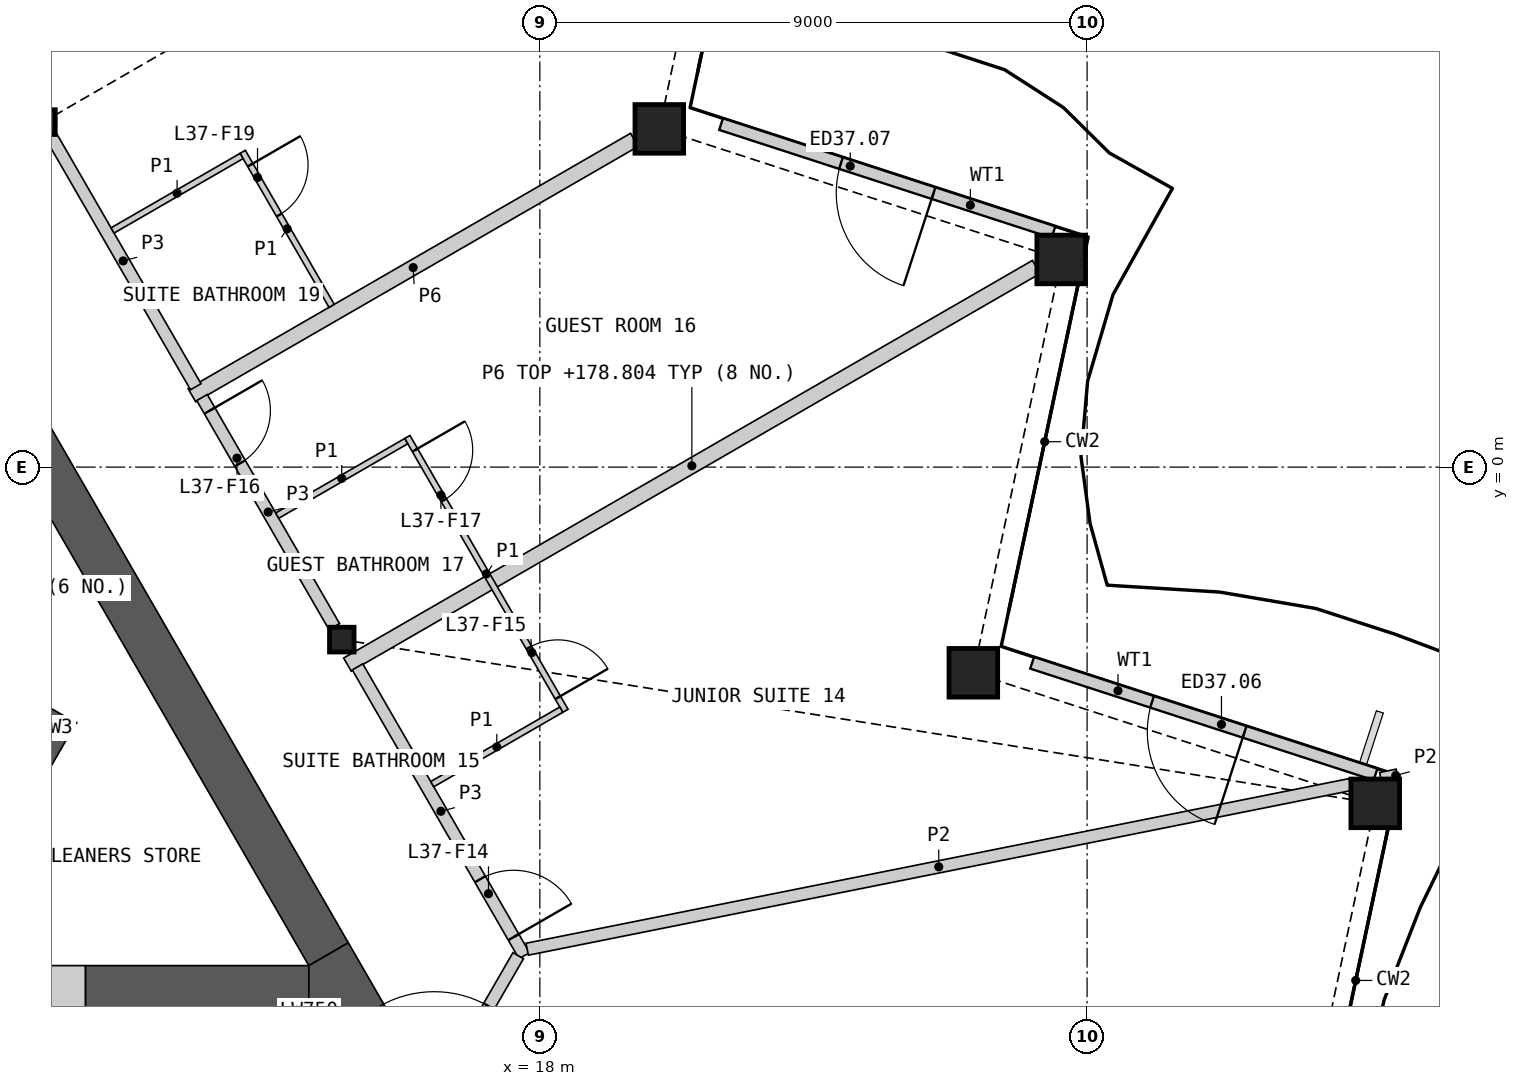
"""IFC4 building model, lengths in metres.
Left out: names, types, materials, properties, quantities, classifications, styles, units other than length and angle.
Written with IfcOpenShell. Run it as: python <this file> out.ifc"""

import sys

from ifc_helpers import new_model, si_unit, direction, frame, frame_2d, origin, origin_2d, place, context, subcontext, project, spatial, polyline, rectangle, hollow_rectangle, i_section, outline, extrude, element, fill, save


model = new_model("IFC4")
c1 = context("Model", 3, precision=1e-05, world=origin(), true_north=direction((0.0, 1.0)))
c2 = subcontext(c1, "Body", "Model", "MODEL_VIEW")
j1 = project(units=[si_unit("LENGTHUNIT", "METRE"), si_unit("PLANEANGLEUNIT", "RADIAN")], contexts=[c1])
p1 = place(None, origin())
s1 = spatial("IfcSite", under=j1, at=p1, CompositionType="ELEMENT")
p2 = place(p1, origin())
s2 = spatial("IfcBuilding", under=s1, at=p2, CompositionType="ELEMENT")
p3 = place(p2, frame((0.0, 0.0, 176.4)))
s3 = spatial("IfcBuildingStorey", under=s2, at=p3, CompositionType="ELEMENT", Elevation=176.4)
for number, where, z_axis, x_axis in (
    (1, (31.739, -5.53, 0.0), (0.0, 0.0, 1.0), (1.0, 0.0, 0.0)),
    (2, (25.129, -3.383, 0.0), (0.0, 0.0, 1.0), (1.0, 0.0, 0.0)),
    (3, (26.574, 3.415, 0.0), (0.0, 0.0, 1.0), (1.0, 0.0, 0.0)),
    (4, (19.965, 5.563, 0.0), (0.0, 0.0, 1.0), (1.0, 0.0, 0.0)),
):
    element("IfcColumn", number, at=place(p3, frame(where, z_axis=z_axis, x_axis=x_axis)), inside=s3, PredefinedType="COLUMN", context=c2, shape_type="SweptSolid", body=[
        extrude(hollow_rectangle(XDim=0.8, YDim=0.8, WallThickness=0.05, at=origin_2d()), origin(), (0.0, 0.0, 1.0), 3.6),
    ])
for number, where, z_axis, x_axis in (
    (5, (14.743, -2.837, 0.0), (0.0, 0.0, 1.0), (1.0, 0.0, 0.0)),
    (6, (9.828, 5.675, 0.0), (0.0, 0.0, 1.0), (1.0, 0.0, 0.0)),
):
    element("IfcColumn", number, at=place(p3, frame(where, z_axis=z_axis, x_axis=x_axis)), inside=s3, PredefinedType="COLUMN", context=c2, shape_type="SweptSolid", body=[
        extrude(i_section(OverallWidth=0.404, OverallDepth=0.407, WebThickness=0.027, FlangeThickness=0.044, at=origin_2d()), origin(), (0.0, 0.0, 1.0), 3.6),
    ])
p4 = place(p3, frame((31.743, -5.054, 0.0), z_axis=(0.0, 0.0, 1.0), x_axis=(-0.951061260164, 0.309002393867, 0.0)))
e7 = element("IfcWall", 7, at=p4, inside=s3, PredefinedType="SOLIDWALL", context=c2, shape_type="SweptSolid", body=[
    extrude(rectangle(XDim=5.938, YDim=0.2, at=frame_2d((2.969, 0.0))), origin(), (0.0, 0.0, 1.0), 2.701),
])
p5 = place(p4, frame((2.264, 0.0, 0.0)))
e8 = element("IfcOpeningElement", 8, at=p5, cuts=e7, PredefinedType="OPENING", context=c2, shape_type="SweptSolid", body=[
    extrude(rectangle(XDim=1.6, YDim=2.4, at=frame_2d((0.8, 1.2))), frame((0.0, 0.11, 0.0), z_axis=(0.0, -1.0, 0.0), x_axis=(1.0, 0.0, 0.0)), (0.0, 0.0, 1.0), 0.22),
])
p6 = place(p3, frame((26.447, 3.865, 0.0), z_axis=(0.0, 0.0, 1.0), x_axis=(-0.951043432761, 0.309057258453, 0.0)))
e9 = element("IfcWall", 9, at=p6, inside=s3, PredefinedType="SOLIDWALL", context=c2, shape_type="SweptSolid", body=[
    extrude(rectangle(XDim=5.748, YDim=0.2, at=frame_2d((2.874, 0.0))), origin(), (0.0, 0.0, 1.0), 2.701),
])
p7 = place(p6, frame((2.074, 0.0, 0.0)))
e10 = element("IfcOpeningElement", 10, at=p7, cuts=e9, PredefinedType="OPENING", context=c2, shape_type="SweptSolid", body=[
    extrude(rectangle(XDim=1.6, YDim=2.4, at=frame_2d((0.8, 1.2))), frame((0.0, 0.11, 0.0), z_axis=(0.0, -1.0, 0.0), x_axis=(1.0, 0.0, 0.0)), (0.0, 0.0, 1.0), 0.22),
])
p8 = place(p3, origin())
e11 = element("IfcWall", 11, at=p8, inside=s3, PredefinedType="SHEAR", context=c2, shape_type="SweptSolid", body=[
    extrude(outline(polyline([(8.83, -6.881), (10.374, -4.206), (10.032, -4.298), (8.738, -6.539), (8.83, -6.881)])), origin(), (0.0, 0.0, 1.0), 3.25),
])
p9 = place(p3, origin())
e12 = element("IfcWall", 12, at=p9, inside=s3, PredefinedType="SHEAR", context=c2, shape_type="SweptSolid", body=[
    extrude(outline(polyline([(10.032, -4.298), (10.374, -4.206), (5.307, -1.281), (5.182, -1.498), (10.032, -4.298)])), origin(), (0.0, 0.0, 1.0), 3.25),
])
p10 = place(p3, frame((10.525, -8.574, 0.0), z_axis=(0.0, 0.0, 1.0), x_axis=(1.0, 0.0, 0.0)))
e13 = element("IfcWall", 13, at=p10, inside=s3, PredefinedType="SHEAR", context=c2, shape_type="SweptSolid", body=[
    extrude(rectangle(XDim=3.676, YDim=0.75, at=frame_2d((1.838, 0.0))), origin(), (0.0, 0.0, 1.0), 3.25),
])
p11 = place(p3, frame((14.526, -8.011, 0.0), z_axis=(0.0, 0.0, 1.0), x_axis=(-0.499994855372, 0.866028374016, 0.0)))
e14 = element("IfcWall", 14, at=p11, inside=s3, PredefinedType="SHEAR", context=c2, shape_type="SweptSolid", body=[
    extrude(rectangle(XDim=14.301, YDim=0.75, at=frame_2d((7.15, 0.0))), origin(), (0.0, 0.0, 1.0), 3.25),
])
p12 = place(p3, origin())
e15 = element("IfcWall", 15, at=p12, inside=s3, PredefinedType="SHEAR", context=c2, shape_type="SweptSolid", body=[
    extrude(outline(polyline([(14.201, -8.949), (14.201, -8.199), (14.851, -7.824), (15.5, -8.949), (14.201, -8.949)])), origin(), (0.0, 0.0, 1.0), 3.25),
])
p13 = place(p3, frame((8.325, -8.574, 0.0), z_axis=(0.0, 0.0, 1.0), x_axis=(1.0, 0.0, 0.0)))
e16 = element("IfcWall", 16, at=p13, inside=s3, PredefinedType="SHEAR", context=c2, shape_type="SweptSolid", body=[
    extrude(rectangle(XDim=2.2, YDim=0.75, at=frame_2d((1.1, 0.0))), origin(), (0.0, 0.0, 1.0), 3.25),
])
p14 = place(p13, frame((0.6, 0.0, 0.0)))
e17 = element("IfcOpeningElement", 17, at=p14, cuts=e16, PredefinedType="OPENING", context=c2, shape_type="SweptSolid", body=[
    extrude(rectangle(XDim=1.0, YDim=2.1, at=frame_2d((0.5, 1.05))), frame((0.0, 0.385, 0.0), z_axis=(0.0, -1.0, 0.0), x_axis=(1.0, 0.0, 0.0)), (0.0, 0.0, 1.0), 0.77),
])
p15 = place(p3, frame((14.836, -3.249, 0.0), z_axis=(0.0, 0.0, 1.0), x_axis=(0.866022412254, 0.500005181446, 0.0)))
e18 = element("IfcWall", 18, at=p15, inside=s3, PredefinedType="PARTITIONING", context=c2, shape_type="SweptSolid", body=[
    extrude(rectangle(XDim=13.081, YDim=0.25, at=frame_2d((6.541, 0.0))), origin(), (0.0, 0.0, 1.0), 2.404),
])
p16 = place(p3, frame((12.278, 1.182, 0.0), z_axis=(0.0, 0.0, 1.0), x_axis=(0.866024457297, 0.500001639361, 0.0)))
e19 = element("IfcWall", 19, at=p16, inside=s3, PredefinedType="PARTITIONING", context=c2, shape_type="SweptSolid", body=[
    extrude(rectangle(XDim=8.402, YDim=0.25, at=frame_2d((4.201, 0.0))), origin(), (0.0, 0.0, 1.0), 2.404),
])
p17 = place(p3, frame((15.002, -3.286, 0.0), z_axis=(0.0, 0.0, 1.0), x_axis=(0.500007607708, -0.866021011428, 0.0)))
e20 = element("IfcWall", 20, at=p17, inside=s3, PredefinedType="PARTITIONING", context=c2, shape_type="SweptSolid", body=[
    extrude(rectangle(XDim=5.484, YDim=0.2, at=frame_2d((2.742, 0.0))), origin(), (0.0, 0.0, 1.0), 3.25),
])
p18 = place(p17, frame((4.032, 0.0, 0.0)))
e21 = element("IfcOpeningElement", 21, at=p18, cuts=e20, PredefinedType="OPENING", context=c2, shape_type="SweptSolid", body=[
    extrude(rectangle(XDim=1.1, YDim=2.1, at=frame_2d((0.55, 1.05))), frame((0.0, 0.11, 0.0), z_axis=(0.0, -1.0, 0.0), x_axis=(1.0, 0.0, 0.0)), (0.0, 0.0, 1.0), 0.22),
])
p19 = place(p3, frame((9.952, 5.461, 0.0), z_axis=(0.0, 0.0, 1.0), x_axis=(0.499990736708, -0.866030751883, 0.0)))
e22 = element("IfcWall", 22, at=p19, inside=s3, PredefinedType="PARTITIONING", context=c2, shape_type="SweptSolid", body=[
    extrude(rectangle(XDim=4.779, YDim=0.2, at=frame_2d((2.389, 0.0))), origin(), (0.0, 0.0, 1.0), 3.25),
])
p20 = place(p3, frame((12.444, 1.145, 0.0), z_axis=(0.0, 0.0, 1.0), x_axis=(0.500007404367, -0.866021128829, 0.0)))
e23 = element("IfcWall", 23, at=p20, inside=s3, PredefinedType="PARTITIONING", context=c2, shape_type="SweptSolid", body=[
    extrude(rectangle(XDim=4.351, YDim=0.2, at=frame_2d((2.176, 0.0))), origin(), (0.0, 0.0, 1.0), 3.25),
])
p21 = place(p20, frame((0.25, 0.0, 0.0)))
e24 = element("IfcOpeningElement", 24, at=p21, cuts=e23, PredefinedType="OPENING", context=c2, shape_type="SweptSolid", body=[
    extrude(rectangle(XDim=1.0, YDim=2.1, at=frame_2d((0.5, 1.05))), frame((0.0, 0.11, 0.0), z_axis=(0.0, -1.0, 0.0), x_axis=(1.0, 0.0, 0.0)), (0.0, 0.0, 1.0), 0.22),
])
p22 = place(p3, frame((15.731, -11.349, 0.0), z_axis=(0.0, 0.0, 1.0), x_axis=(0.499961815444, 0.866047448526, 0.0)))
e25 = element("IfcWall", 25, at=p22, inside=s3, PredefinedType="PARTITIONING", context=c2, shape_type="SweptSolid", body=[
    extrude(rectangle(XDim=3.826, YDim=0.2, at=frame_2d((1.913, 0.0))), origin(), (0.0, 0.0, 1.0), 3.25),
])
p23 = place(p22, frame((1.064, 0.0, 0.0)))
e26 = element("IfcOpeningElement", 26, at=p23, cuts=e25, PredefinedType="OPENING", context=c2, shape_type="SweptSolid", body=[
    extrude(rectangle(XDim=1.8, YDim=2.1, at=frame_2d((0.9, 1.05))), frame((0.0, 0.11, 0.0), z_axis=(0.0, -1.0, 0.0), x_axis=(1.0, 0.0, 0.0)), (0.0, 0.0, 1.0), 0.22),
])
p24 = place(p3, frame((17.792, -7.929, 0.0), z_axis=(0.0, 0.0, 1.0), x_axis=(0.980565709097, 0.196190953266, 0.0)))
e27 = element("IfcWall", 27, at=p24, inside=s3, PredefinedType="PARTITIONING", context=c2, shape_type="SweptSolid", body=[
    extrude(rectangle(XDim=13.805, YDim=0.2, at=frame_2d((6.903, 0.0))), origin(), (0.0, 0.0, 1.0), 2.404),
])
p25 = place(p3, frame((31.831, -5.12, 0.0), z_axis=(0.0, 0.0, 1.0), x_axis=(0.980512850695, 0.19645495571, 0.0)))
e28 = element("IfcWall", 28, at=p25, inside=s3, PredefinedType="PARTITIONING", context=c2, shape_type="SweptSolid", body=[
    extrude(rectangle(XDim=0.277, YDim=0.2, at=frame_2d((0.139, 0.0))), origin(), (0.0, 0.0, 1.0), 2.404),
])
p26 = place(p3, frame((15.821, 0.495, 0.0), z_axis=(0.0, 0.0, 1.0), x_axis=(0.500006934395, -0.866021400173, 0.0)))
e29 = element("IfcWall", 29, at=p26, inside=s3, PredefinedType="PARTITIONING", context=c2, shape_type="SweptSolid", body=[
    extrude(rectangle(XDim=5.2, YDim=0.1, at=frame_2d((2.6, 0.0))), origin(), (0.0, 0.0, 1.0), 2.404),
])
p27 = place(p26, frame((4.0, 0.0, 0.0)))
e30 = element("IfcOpeningElement", 30, at=p27, cuts=e29, PredefinedType="OPENING", context=c2, shape_type="SweptSolid", body=[
    extrude(rectangle(XDim=0.95, YDim=2.1, at=frame_2d((0.475, 1.05))), frame((0.0, 0.06, 0.0), z_axis=(0.0, -1.0, 0.0), x_axis=(1.0, 0.0, 0.0)), (0.0, 0.0, 1.0), 0.12),
])
p28 = place(p26, frame((0.25, 0.0, 0.0)))
e31 = element("IfcOpeningElement", 31, at=p28, cuts=e29, PredefinedType="OPENING", context=c2, shape_type="SweptSolid", body=[
    extrude(rectangle(XDim=0.95, YDim=2.1, at=frame_2d((0.475, 1.05))), frame((0.0, 0.06, 0.0), z_axis=(0.0, -1.0, 0.0), x_axis=(1.0, 0.0, 0.0)), (0.0, 0.0, 1.0), 0.12),
])
p29 = place(p3, frame((13.113, 5.186, 0.0), z_axis=(0.0, 0.0, 1.0), x_axis=(0.499963291492, -0.866046596414, 0.0)))
e32 = element("IfcWall", 32, at=p29, inside=s3, PredefinedType="PARTITIONING", context=c2, shape_type="SweptSolid", body=[
    extrude(rectangle(XDim=2.925, YDim=0.1, at=frame_2d((1.462, 0.0))), origin(), (0.0, 0.0, 1.0), 2.404),
])
p30 = place(p29, frame((0.25, 0.0, 0.0)))
e33 = element("IfcOpeningElement", 33, at=p30, cuts=e32, PredefinedType="OPENING", context=c2, shape_type="SweptSolid", body=[
    extrude(rectangle(XDim=0.95, YDim=2.1, at=frame_2d((0.475, 1.05))), frame((0.0, 0.06, 0.0), z_axis=(0.0, -1.0, 0.0), x_axis=(1.0, 0.0, 0.0)), (0.0, 0.0, 1.0), 0.12),
])
p31 = place(p3, frame((16.231, -5.215, 0.0), z_axis=(0.0, 0.0, 1.0), x_axis=(0.866057815567, 0.499943856944, 0.0)))
e34 = element("IfcWall", 34, at=p31, inside=s3, PredefinedType="PARTITIONING", context=c2, shape_type="SweptSolid", body=[
    extrude(rectangle(XDim=2.45, YDim=0.1, at=frame_2d((1.225, 0.0))), origin(), (0.0, 0.0, 1.0), 2.404),
])
p32 = place(p3, frame((13.681, -0.798, 0.0), z_axis=(0.0, 0.0, 1.0), x_axis=(0.866032905446, 0.499987006516, 0.0)))
e35 = element("IfcWall", 35, at=p32, inside=s3, PredefinedType="PARTITIONING", context=c2, shape_type="SweptSolid", body=[
    extrude(rectangle(XDim=2.45, YDim=0.1, at=frame_2d((1.225, 0.0))), origin(), (0.0, 0.0, 1.0), 2.404),
])
p33 = place(p3, frame((10.973, 3.892, 0.0), z_axis=(0.0, 0.0, 1.0), x_axis=(0.866014668023, 0.500018594424, 0.0)))
e36 = element("IfcWall", 36, at=p33, inside=s3, PredefinedType="PARTITIONING", context=c2, shape_type="SweptSolid", body=[
    extrude(rectangle(XDim=2.45, YDim=0.1, at=frame_2d((1.225, 0.0))), origin(), (0.0, 0.0, 1.0), 2.404),
])
p34 = place(p5, origin())
e37 = element("IfcDoor", 37, at=p34, inside=s3, OperationType="DOUBLE_DOOR_SINGLE_SWING", PredefinedType="DOOR", context=c2, shape_type="SweptSolid", body=[
    extrude(rectangle(XDim=1.6, YDim=2.4, at=frame_2d((0.8, 1.2))), frame((0.0, 0.025, 0.0), z_axis=(0.0, -1.0, 0.0), x_axis=(1.0, 0.0, 0.0)), (0.0, 0.0, 1.0), 0.05),
])
fill(e8, e37)
p35 = place(p7, origin())
e38 = element("IfcDoor", 38, at=p35, inside=s3, OperationType="DOUBLE_DOOR_SINGLE_SWING", PredefinedType="DOOR", context=c2, shape_type="SweptSolid", body=[
    extrude(rectangle(XDim=1.6, YDim=2.4, at=frame_2d((0.8, 1.2))), frame((0.0, 0.025, 0.0), z_axis=(0.0, -1.0, 0.0), x_axis=(1.0, 0.0, 0.0)), (0.0, 0.0, 1.0), 0.05),
])
fill(e10, e38)
p36 = place(p23, origin())
e39 = element("IfcDoor", 39, at=p36, inside=s3, OperationType="DOUBLE_DOOR_SINGLE_SWING", PredefinedType="DOOR", context=c2, shape_type="SweptSolid", body=[
    extrude(rectangle(XDim=1.8, YDim=2.1, at=frame_2d((0.9, 1.05))), frame((0.0, 0.025, 0.0), z_axis=(0.0, -1.0, 0.0), x_axis=(1.0, 0.0, 0.0)), (0.0, 0.0, 1.0), 0.05),
])
fill(e26, e39)
p37 = place(p18, origin())
e40 = element("IfcDoor", 40, at=p37, inside=s3, OperationType="SINGLE_SWING_RIGHT", PredefinedType="DOOR", context=c2, shape_type="SweptSolid", body=[
    extrude(rectangle(XDim=1.1, YDim=2.1, at=frame_2d((0.55, 1.05))), frame((0.0, 0.025, 0.0), z_axis=(0.0, -1.0, 0.0), x_axis=(1.0, 0.0, 0.0)), (0.0, 0.0, 1.0), 0.05),
])
fill(e21, e40)
p38 = place(p27, origin())
e41 = element("IfcDoor", 41, at=p38, inside=s3, OperationType="SINGLE_SWING_RIGHT", PredefinedType="DOOR", context=c2, shape_type="SweptSolid", body=[
    extrude(rectangle(XDim=0.95, YDim=2.1, at=frame_2d((0.475, 1.05))), frame((0.0, 0.025, 0.0), z_axis=(0.0, -1.0, 0.0), x_axis=(1.0, 0.0, 0.0)), (0.0, 0.0, 1.0), 0.05),
])
fill(e30, e41)
p39 = place(p21, origin())
e42 = element("IfcDoor", 42, at=p39, inside=s3, OperationType="SINGLE_SWING_LEFT", PredefinedType="DOOR", context=c2, shape_type="SweptSolid", body=[
    extrude(rectangle(XDim=1.0, YDim=2.1, at=frame_2d((0.5, 1.05))), frame((0.0, 0.025, 0.0), z_axis=(0.0, -1.0, 0.0), x_axis=(1.0, 0.0, 0.0)), (0.0, 0.0, 1.0), 0.05),
])
fill(e24, e42)
p40 = place(p28, origin())
e43 = element("IfcDoor", 43, at=p40, inside=s3, OperationType="SINGLE_SWING_LEFT", PredefinedType="DOOR", context=c2, shape_type="SweptSolid", body=[
    extrude(rectangle(XDim=0.95, YDim=2.1, at=frame_2d((0.475, 1.05))), frame((0.0, 0.025, 0.0), z_axis=(0.0, -1.0, 0.0), x_axis=(1.0, 0.0, 0.0)), (0.0, 0.0, 1.0), 0.05),
])
fill(e31, e43)
p41 = place(p30, origin())
e44 = element("IfcDoor", 44, at=p41, inside=s3, OperationType="SINGLE_SWING_LEFT", PredefinedType="DOOR", context=c2, shape_type="SweptSolid", body=[
    extrude(rectangle(XDim=0.95, YDim=2.1, at=frame_2d((0.475, 1.05))), frame((0.0, 0.025, 0.0), z_axis=(0.0, -1.0, 0.0), x_axis=(1.0, 0.0, 0.0)), (0.0, 0.0, 1.0), 0.05),
])
fill(e33, e44)
save(model, sys.argv[1])
